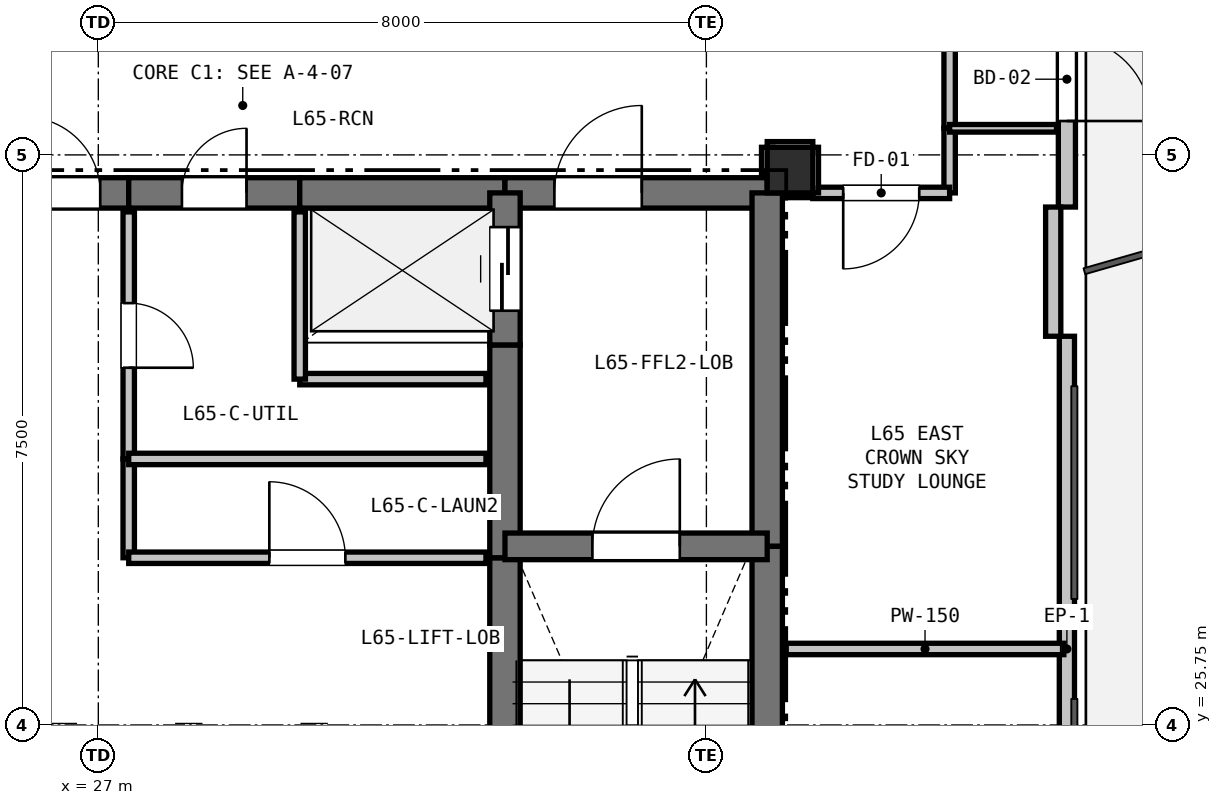
"""IFC4 building model, lengths in metres.
Left out: names, types, materials, properties, quantities, classifications, styles, units other than length and angle.
Written with IfcOpenShell. Run it as: python <this file> out.ifc"""

import sys

from ifc_helpers import new_model, si_unit, direction, frame, frame_2d, origin, origin_2d, place, context, subcontext, project, spatial, rectangle, extrude, element, fill, save


model = new_model("IFC4")
c1 = context("Model", 3, precision=1e-05, world=origin(), true_north=direction((0.0, 1.0)))
c2 = subcontext(c1, "Body", "Model", "MODEL_VIEW")
j1 = project(units=[si_unit("LENGTHUNIT", "METRE"), si_unit("PLANEANGLEUNIT", "RADIAN")], contexts=[c1])
p1 = place(None, origin())
s1 = spatial("IfcSite", under=j1, at=p1, CompositionType="ELEMENT")
p2 = place(p1, origin())
s2 = spatial("IfcBuilding", under=s1, at=p2, CompositionType="ELEMENT")
p3 = place(p2, frame((0.0, 0.0, 233.1)))
s3 = spatial("IfcBuildingStorey", under=s2, at=p3, CompositionType="ELEMENT", Elevation=233.1)
p4 = place(p3, frame((36.1, 33.05, 0.0), z_axis=(0.0, 0.0, 1.0), x_axis=(1.0, 0.0, 0.0)))
e1 = element("IfcColumn", 1, at=p4, inside=s3, PredefinedType="COLUMN", context=c2, shape_type="SweptSolid", body=[
    extrude(rectangle(XDim=0.6, YDim=0.6, at=origin_2d()), origin(), (0.0, 0.0, 1.0), 3.3),
])
p5 = place(p3, frame((20.066, 33.997, 0.0), z_axis=(0.0, 0.0, 1.0), x_axis=(0.866019557082, 0.500010126649, 0.0)))
e2 = element("IfcWall", 2, at=p5, inside=s3, PredefinedType="PARAPET", context=c2, shape_type="SweptSolid", body=[
    extrude(rectangle(XDim=8.228, YDim=0.2, at=frame_2d((4.114, 0.0))), origin(), (0.0, 0.0, 1.0), 0.2),
])
p6 = place(p3, frame((39.743, 41.492, 0.0), z_axis=(0.0, 0.0, 1.0), x_axis=(0.0, -1.0, 0.0)))
e3 = element("IfcWall", 3, at=p6, inside=s3, PredefinedType="SOLIDWALL", context=c2, shape_type="SweptSolid", body=[
    extrude(rectangle(XDim=8.928, YDim=0.225, at=frame_2d((4.464, 0.0))), origin(), (0.0, 0.0, 1.0), 2.7),
])
p7 = place(p6, frame((6.696, 0.0, 0.0)))
e4 = element("IfcOpeningElement", 4, at=p7, cuts=e3, PredefinedType="OPENING", context=c2, shape_type="SweptSolid", body=[
    extrude(rectangle(XDim=1.1, YDim=2.1, at=frame_2d((0.55, 1.05))), frame((0.0, 0.123, 0.0), z_axis=(0.0, -1.0, 0.0), x_axis=(1.0, 0.0, 0.0)), (0.0, 0.0, 1.0), 0.245),
])
p8 = place(p3, frame((39.743, 30.864, 0.0), z_axis=(0.0, 0.0, 1.0), x_axis=(0.0, -1.0, 0.0)))
e5 = element("IfcWall", 5, at=p8, inside=s3, PredefinedType="PARAPET", context=c2, shape_type="SweptSolid", body=[
    extrude(rectangle(XDim=8.228, YDim=0.2, at=frame_2d((4.114, 0.0))), origin(), (0.0, 0.0, 1.0), 0.2),
])
p9 = place(p3, frame((39.563, 32.564, 0.0), z_axis=(0.0, 0.0, 1.0), x_axis=(0.0, -1.0, 0.0)))
e6 = element("IfcWall", 6, at=p9, inside=s3, PredefinedType="PARAPET", context=c2, shape_type="SweptSolid", body=[
    extrude(rectangle(XDim=1.7, YDim=0.2, at=frame_2d((0.85, 0.0))), origin(), (0.0, 0.0, 1.0), 2.7),
])
p10 = place(p3, frame((25.65, 32.75, 0.0), z_axis=(0.0, 0.0, 1.0), x_axis=(1.0, 0.0, 0.0)))
e7 = element("IfcWall", 7, at=p10, inside=s3, PredefinedType="SHEAR", context=c2, shape_type="SweptSolid", body=[
    extrude(rectangle(XDim=1.75, YDim=0.4, at=frame_2d((0.875, 0.0))), origin(), (0.0, 0.0, 1.0), 3.08),
])
p11 = place(p10, frame((0.375, 0.0, 0.0)))
e8 = element("IfcOpeningElement", 8, at=p11, cuts=e7, PredefinedType="OPENING", context=c2, shape_type="SweptSolid", body=[
    extrude(rectangle(XDim=1.0, YDim=2.15, at=frame_2d((0.5, 1.075))), frame((0.0, 0.21, 0.0), z_axis=(0.0, -1.0, 0.0), x_axis=(1.0, 0.0, 0.0)), (0.0, 0.0, 1.0), 0.42),
])
p12 = place(p3, frame((27.4, 32.75, 0.0), z_axis=(0.0, 0.0, 1.0), x_axis=(1.0, 0.0, 0.0)))
e9 = element("IfcWall", 9, at=p12, inside=s3, PredefinedType="SHEAR", context=c2, shape_type="SweptSolid", body=[
    extrude(rectangle(XDim=2.25, YDim=0.4, at=frame_2d((1.125, 0.0))), origin(), (0.0, 0.0, 1.0), 3.08),
])
p13 = place(p12, frame((0.7, 0.0, 0.0)))
e10 = element("IfcOpeningElement", 10, at=p13, cuts=e9, PredefinedType="OPENING", context=c2, shape_type="SweptSolid", body=[
    extrude(rectangle(XDim=0.85, YDim=2.1, at=frame_2d((0.425, 1.05))), frame((0.0, 0.21, 0.0), z_axis=(0.0, -1.0, 0.0), x_axis=(1.0, 0.0, 0.0)), (0.0, 0.0, 1.0), 0.42),
])
p14 = place(p3, frame((29.65, 32.75, 0.0), z_axis=(0.0, 0.0, 1.0), x_axis=(1.0, 0.0, 0.0)))
e11 = element("IfcWall", 11, at=p14, inside=s3, PredefinedType="SHEAR", context=c2, shape_type="SweptSolid", body=[
    extrude(rectangle(XDim=2.7, YDim=0.4, at=frame_2d((1.35, 0.0))), origin(), (0.0, 0.0, 1.0), 3.08),
])
p15 = place(p3, frame((32.35, 32.75, 0.0), z_axis=(0.0, 0.0, 1.0), x_axis=(1.0, 0.0, 0.0)))
e12 = element("IfcWall", 12, at=p15, inside=s3, PredefinedType="SHEAR", context=c2, shape_type="SweptSolid", body=[
    extrude(rectangle(XDim=3.45, YDim=0.4, at=frame_2d((1.725, 0.0))), origin(), (0.0, 0.0, 1.0), 3.08),
])
p16 = place(p15, frame((0.65, 0.0, 0.0)))
e13 = element("IfcOpeningElement", 13, at=p16, cuts=e12, PredefinedType="OPENING", context=c2, shape_type="SweptSolid", body=[
    extrude(rectangle(XDim=1.15, YDim=2.15, at=frame_2d((0.575, 1.075))), frame((0.0, 0.21, 0.0), z_axis=(0.0, -1.0, 0.0), x_axis=(1.0, 0.0, 0.0)), (0.0, 0.0, 1.0), 0.42),
])
p17 = place(p3, frame((35.8, 32.75, 0.0), z_axis=(0.0, 0.0, 1.0), x_axis=(0.0, -1.0, 0.0)))
e14 = element("IfcWall", 14, at=p17, inside=s3, PredefinedType="SHEAR", context=c2, shape_type="SweptSolid", body=[
    extrude(rectangle(XDim=4.65, YDim=0.4, at=frame_2d((2.325, 0.0))), origin(), (0.0, 0.0, 1.0), 3.08),
])
p18 = place(p3, frame((35.8, 28.1, 0.0), z_axis=(0.0, 0.0, 1.0), x_axis=(0.0, -1.0, 0.0)))
e15 = element("IfcWall", 15, at=p18, inside=s3, PredefinedType="SHEAR", context=c2, shape_type="SweptSolid", body=[
    extrude(rectangle(XDim=7.35, YDim=0.4, at=frame_2d((3.675, 0.0))), origin(), (0.0, 0.0, 1.0), 3.08),
])
p19 = place(p3, frame((32.35, 25.55, 0.0), z_axis=(0.0, 0.0, 1.0), x_axis=(0.0, 1.0, 0.0)))
e16 = element("IfcWall", 16, at=p19, inside=s3, PredefinedType="SHEAR", context=c2, shape_type="SweptSolid", body=[
    extrude(rectangle(XDim=2.4, YDim=0.4, at=frame_2d((1.2, 0.0))), origin(), (0.0, 0.0, 1.0), 3.08),
])
p20 = place(p3, frame((32.35, 27.95, 0.0), z_axis=(0.0, 0.0, 1.0), x_axis=(0.0, 1.0, 0.0)))
e17 = element("IfcWall", 17, at=p20, inside=s3, PredefinedType="SHEAR", context=c2, shape_type="SweptSolid", body=[
    extrude(rectangle(XDim=2.8, YDim=0.4, at=frame_2d((1.4, 0.0))), origin(), (0.0, 0.0, 1.0), 3.08),
])
p21 = place(p3, frame((32.35, 30.75, 0.0), z_axis=(0.0, 0.0, 1.0), x_axis=(0.0, 1.0, 0.0)))
e18 = element("IfcWall", 18, at=p21, inside=s3, PredefinedType="SHEAR", context=c2, shape_type="SweptSolid", body=[
    extrude(rectangle(XDim=2.0, YDim=0.4, at=frame_2d((1.0, 0.0))), origin(), (0.0, 0.0, 1.0), 3.08),
])
p22 = place(p21, frame((0.45, 0.0, 0.0)))
e19 = element("IfcOpeningElement", 19, at=p22, cuts=e18, PredefinedType="OPENING", context=c2, shape_type="SweptSolid", body=[
    extrude(rectangle(XDim=1.1, YDim=2.15, at=frame_2d((0.55, 1.075))), frame((0.0, 0.21, 0.0), z_axis=(0.0, -1.0, 0.0), x_axis=(1.0, 0.0, 0.0)), (0.0, 0.0, 1.0), 0.42),
])
p23 = place(p3, frame((32.35, 28.1, 0.0), z_axis=(0.0, 0.0, 1.0), x_axis=(1.0, 0.0, 0.0)))
e20 = element("IfcWall", 20, at=p23, inside=s3, PredefinedType="SHEAR", context=c2, shape_type="SweptSolid", body=[
    extrude(rectangle(XDim=3.45, YDim=0.35, at=frame_2d((1.725, 0.0))), origin(), (0.0, 0.0, 1.0), 3.08),
])
p24 = place(p23, frame((1.15, 0.0, 0.0)))
e21 = element("IfcOpeningElement", 21, at=p24, cuts=e20, PredefinedType="OPENING", context=c2, shape_type="SweptSolid", body=[
    extrude(rectangle(XDim=1.15, YDim=2.15, at=frame_2d((0.575, 1.075))), frame((0.0, 0.185, 0.0), z_axis=(0.0, -1.0, 0.0), x_axis=(1.0, 0.0, 0.0)), (0.0, 0.0, 1.0), 0.37),
])
p25 = place(p3, frame((32.1, 30.3, 0.0), z_axis=(0.0, 0.0, 1.0), x_axis=(-1.0, 0.0, 0.0)))
e22 = element("IfcWall", 22, at=p25, inside=s3, PredefinedType="PARTITIONING", context=c2, shape_type="SweptSolid", body=[
    extrude(rectangle(XDim=2.45, YDim=0.15, at=frame_2d((1.225, 0.0))), origin(), (0.0, 0.0, 1.0), 3.08),
])
p26 = place(p3, frame((29.65, 30.3, 0.0), z_axis=(0.0, 0.0, 1.0), x_axis=(0.0, 1.0, 0.0)))
e23 = element("IfcWall", 23, at=p26, inside=s3, PredefinedType="PARTITIONING", context=c2, shape_type="SweptSolid", body=[
    extrude(rectangle(XDim=2.2, YDim=0.15, at=frame_2d((1.1, 0.0))), origin(), (0.0, 0.0, 1.0), 3.08),
])
p27 = place(p3, frame((27.4, 32.5, 0.0), z_axis=(0.0, 0.0, 1.0), x_axis=(0.0, -1.0, 0.0)))
e24 = element("IfcWall", 24, at=p27, inside=s3, PredefinedType="PARTITIONING", context=c2, shape_type="SweptSolid", body=[
    extrude(rectangle(XDim=3.25, YDim=0.15, at=frame_2d((1.625, 0.0))), origin(), (0.0, 0.0, 1.0), 3.08),
])
p28 = place(p27, frame((1.2, 0.0, 0.0)))
e25 = element("IfcOpeningElement", 25, at=p28, cuts=e24, PredefinedType="OPENING", context=c2, shape_type="SweptSolid", body=[
    extrude(rectangle(XDim=0.85, YDim=2.1, at=frame_2d((0.425, 1.05))), frame((0.0, 0.085, 0.0), z_axis=(0.0, -1.0, 0.0), x_axis=(1.0, 0.0, 0.0)), (0.0, 0.0, 1.0), 0.17),
])
p29 = place(p3, frame((27.4, 29.25, 0.0), z_axis=(0.0, 0.0, 1.0), x_axis=(0.0, -1.0, 0.0)))
e26 = element("IfcWall", 26, at=p29, inside=s3, PredefinedType="PARTITIONING", context=c2, shape_type="SweptSolid", body=[
    extrude(rectangle(XDim=1.3, YDim=0.15, at=frame_2d((0.65, 0.0))), origin(), (0.0, 0.0, 1.0), 3.08),
])
p30 = place(p3, frame((27.4, 27.95, 0.0), z_axis=(0.0, 0.0, 1.0), x_axis=(1.0, 0.0, 0.0)))
e27 = element("IfcWall", 27, at=p30, inside=s3, PredefinedType="PARTITIONING", context=c2, shape_type="SweptSolid", body=[
    extrude(rectangle(XDim=4.7, YDim=0.15, at=frame_2d((2.35, 0.0))), origin(), (0.0, 0.0, 1.0), 3.08),
])
p31 = place(p30, frame((1.85, 0.0, 0.0)))
e28 = element("IfcOpeningElement", 28, at=p31, cuts=e27, PredefinedType="OPENING", context=c2, shape_type="SweptSolid", body=[
    extrude(rectangle(XDim=1.0, YDim=2.15, at=frame_2d((0.5, 1.075))), frame((0.0, 0.085, 0.0), z_axis=(0.0, -1.0, 0.0), x_axis=(1.0, 0.0, 0.0)), (0.0, 0.0, 1.0), 0.17),
])
p32 = place(p3, frame((38.2, 35.2, 0.0), z_axis=(0.0, 0.0, 1.0), x_axis=(0.0, -1.0, 0.0)))
e29 = element("IfcWall", 29, at=p32, inside=s3, PredefinedType="PARTITIONING", context=c2, shape_type="SweptSolid", body=[
    extrude(rectangle(XDim=1.6, YDim=0.15, at=frame_2d((0.8, 0.0))), origin(), (0.0, 0.0, 1.0), 3.08),
])
p33 = place(p3, frame((38.2, 33.6, 0.0), z_axis=(0.0, 0.0, 1.0), x_axis=(0.0, -1.0, 0.0)))
e30 = element("IfcWall", 30, at=p33, inside=s3, PredefinedType="PARTITIONING", context=c2, shape_type="SweptSolid", body=[
    extrude(rectangle(XDim=0.85, YDim=0.15, at=frame_2d((0.425, 0.0))), origin(), (0.0, 0.0, 1.0), 3.08),
])
p34 = place(p3, frame((38.2, 32.75, 0.0), z_axis=(0.0, 0.0, 1.0), x_axis=(-1.0, 0.0, 0.0)))
e31 = element("IfcWall", 31, at=p34, inside=s3, PredefinedType="PARTITIONING", context=c2, shape_type="SweptSolid", body=[
    extrude(rectangle(XDim=1.8, YDim=0.15, at=frame_2d((0.9, 0.0))), origin(), (0.0, 0.0, 1.0), 3.08),
])
p35 = place(p34, frame((0.4, 0.0, 0.0)))
e32 = element("IfcOpeningElement", 32, at=p35, cuts=e31, PredefinedType="OPENING", context=c2, shape_type="SweptSolid", body=[
    extrude(rectangle(XDim=1.0, YDim=2.15, at=frame_2d((0.5, 1.075))), frame((0.0, 0.085, 0.0), z_axis=(0.0, -1.0, 0.0), x_axis=(1.0, 0.0, 0.0)), (0.0, 0.0, 1.0), 0.17),
])
p36 = place(p3, frame((36.4, 32.75, 0.0), z_axis=(0.0, 0.0, 1.0), x_axis=(0.0, 1.0, 0.0)))
e33 = element("IfcWall", 33, at=p36, inside=s3, PredefinedType="PARTITIONING", context=c2, shape_type="SweptSolid", body=[
    extrude(rectangle(XDim=0.6, YDim=0.15, at=frame_2d((0.3, 0.0))), origin(), (0.0, 0.0, 1.0), 2.528),
])
p37 = place(p3, frame((36.4, 33.35, 0.0), z_axis=(0.0, 0.0, 1.0), x_axis=(-1.0, 0.0, 0.0)))
e34 = element("IfcWall", 34, at=p37, inside=s3, PredefinedType="PARTITIONING", context=c2, shape_type="SweptSolid", body=[
    extrude(rectangle(XDim=0.6, YDim=0.15, at=frame_2d((0.3, 0.0))), origin(), (0.0, 0.0, 1.0), 2.528),
])
p38 = place(p3, frame((35.8, 33.35, 0.0), z_axis=(0.0, 0.0, 1.0), x_axis=(0.0, -1.0, 0.0)))
e35 = element("IfcWall", 35, at=p38, inside=s3, PredefinedType="PARTITIONING", context=c2, shape_type="SweptSolid", body=[
    extrude(rectangle(XDim=0.35, YDim=0.15, at=frame_2d((0.175, 0.0))), origin(), (0.0, 0.0, 1.0), 2.605),
])
p39 = place(p3, frame((32.1, 29.25, 0.0), z_axis=(0.0, 0.0, 1.0), x_axis=(-1.0, 0.0, 0.0)))
e36 = element("IfcWall", 36, at=p39, inside=s3, PredefinedType="PARTITIONING", context=c2, shape_type="SweptSolid", body=[
    extrude(rectangle(XDim=4.7, YDim=0.15, at=frame_2d((2.35, 0.0))), origin(), (0.0, 0.0, 1.0), 3.08),
])
p40 = place(p3, frame((36.05, 32.75, 0.0), z_axis=(0.0, 0.0, 1.0), x_axis=(1.0, 0.0, 0.0)))
e37 = element("IfcWall", 37, at=p40, inside=s3, PredefinedType="PARTITIONING", context=c2, shape_type="SweptSolid", body=[
    extrude(rectangle(XDim=0.35, YDim=0.125, at=frame_2d((0.175, 0.0))), origin(), (0.0, 0.0, 1.0), 2.605),
])
p41 = place(p3, frame((38.2, 33.6, 0.0), z_axis=(0.0, 0.0, 1.0), x_axis=(1.0, 0.0, 0.0)))
e38 = element("IfcWall", 38, at=p41, inside=s3, PredefinedType="PARTITIONING", context=c2, shape_type="SweptSolid", body=[
    extrude(rectangle(XDim=1.406, YDim=0.1, at=frame_2d((0.703, 0.0))), origin(), (0.0, 0.0, 1.0), 2.365),
])
p42 = place(p3, frame((39.703, 26.75, 0.0), z_axis=(0.0, 0.0, 1.0), x_axis=(-1.0, 0.0, 0.0)))
e39 = element("IfcWall", 39, at=p42, inside=s3, PredefinedType="PARTITIONING", context=c2, shape_type="SweptSolid", body=[
    extrude(rectangle(XDim=3.653, YDim=0.15, at=frame_2d((1.826, 0.0))), origin(), (0.0, 0.0, 1.0), 2.365),
])
p43 = place(p7, origin())
e40 = element("IfcDoor", 40, at=p43, inside=s3, OperationType="SINGLE_SWING_RIGHT", PredefinedType="DOOR", context=c2, shape_type="SweptSolid", body=[
    extrude(rectangle(XDim=1.1, YDim=2.1, at=frame_2d((0.55, 1.05))), frame((0.0, 0.025, 0.0), z_axis=(0.0, -1.0, 0.0), x_axis=(1.0, 0.0, 0.0)), (0.0, 0.0, 1.0), 0.05),
])
fill(e4, e40)
p44 = place(p11, origin())
e41 = element("IfcDoor", 41, at=p44, inside=s3, OperationType="SINGLE_SWING_LEFT", PredefinedType="DOOR", context=c2, shape_type="SweptSolid", body=[
    extrude(rectangle(XDim=1.0, YDim=2.15, at=frame_2d((0.5, 1.075))), frame((0.0, 0.025, 0.0), z_axis=(0.0, -1.0, 0.0), x_axis=(1.0, 0.0, 0.0)), (0.0, 0.0, 1.0), 0.05),
])
fill(e8, e41)
p45 = place(p22, origin())
e42 = element("IfcDoor", 42, at=p45, inside=s3, OperationType="SLIDING_TO_LEFT", PredefinedType="DOOR", context=c2, shape_type="SweptSolid", body=[
    extrude(rectangle(XDim=1.1, YDim=2.15, at=frame_2d((0.55, 1.075))), frame((0.0, 0.025, 0.0), z_axis=(0.0, -1.0, 0.0), x_axis=(1.0, 0.0, 0.0)), (0.0, 0.0, 1.0), 0.05),
])
fill(e19, e42)
p46 = place(p24, origin())
e43 = element("IfcDoor", 43, at=p46, inside=s3, OperationType="SINGLE_SWING_RIGHT", PredefinedType="DOOR", context=c2, shape_type="SweptSolid", body=[
    extrude(rectangle(XDim=1.15, YDim=2.15, at=frame_2d((0.575, 1.075))), frame((0.0, 0.025, 0.0), z_axis=(0.0, -1.0, 0.0), x_axis=(1.0, 0.0, 0.0)), (0.0, 0.0, 1.0), 0.05),
])
fill(e21, e43)
p47 = place(p16, origin())
e44 = element("IfcDoor", 44, at=p47, inside=s3, OperationType="SINGLE_SWING_RIGHT", PredefinedType="DOOR", context=c2, shape_type="SweptSolid", body=[
    extrude(rectangle(XDim=1.15, YDim=2.15, at=frame_2d((0.575, 1.075))), frame((0.0, 0.025, 0.0), z_axis=(0.0, -1.0, 0.0), x_axis=(1.0, 0.0, 0.0)), (0.0, 0.0, 1.0), 0.05),
])
fill(e13, e44)
p48 = place(p28, origin())
e45 = element("IfcDoor", 45, at=p48, inside=s3, OperationType="SINGLE_SWING_RIGHT", PredefinedType="DOOR", context=c2, shape_type="SweptSolid", body=[
    extrude(rectangle(XDim=0.85, YDim=2.1, at=frame_2d((0.425, 1.05))), frame((0.0, 0.025, 0.0), z_axis=(0.0, -1.0, 0.0), x_axis=(1.0, 0.0, 0.0)), (0.0, 0.0, 1.0), 0.05),
])
fill(e25, e45)
p49 = place(p31, origin())
e46 = element("IfcDoor", 46, at=p49, inside=s3, OperationType="SINGLE_SWING_LEFT", PredefinedType="DOOR", context=c2, shape_type="SweptSolid", body=[
    extrude(rectangle(XDim=1.0, YDim=2.15, at=frame_2d((0.5, 1.075))), frame((0.0, 0.025, 0.0), z_axis=(0.0, -1.0, 0.0), x_axis=(1.0, 0.0, 0.0)), (0.0, 0.0, 1.0), 0.05),
])
fill(e28, e46)
p50 = place(p13, origin())
e47 = element("IfcDoor", 47, at=p50, inside=s3, OperationType="SINGLE_SWING_RIGHT", PredefinedType="DOOR", context=c2, shape_type="SweptSolid", body=[
    extrude(rectangle(XDim=0.85, YDim=2.1, at=frame_2d((0.425, 1.05))), frame((0.0, 0.025, 0.0), z_axis=(0.0, -1.0, 0.0), x_axis=(1.0, 0.0, 0.0)), (0.0, 0.0, 1.0), 0.05),
])
fill(e10, e47)
p51 = place(p35, origin())
e48 = element("IfcDoor", 48, at=p51, inside=s3, OperationType="SINGLE_SWING_RIGHT", PredefinedType="DOOR", context=c2, shape_type="SweptSolid", body=[
    extrude(rectangle(XDim=1.0, YDim=2.15, at=frame_2d((0.5, 1.075))), frame((0.0, 0.025, 0.0), z_axis=(0.0, -1.0, 0.0), x_axis=(1.0, 0.0, 0.0)), (0.0, 0.0, 1.0), 0.05),
])
fill(e32, e48)
save(model, sys.argv[1])
